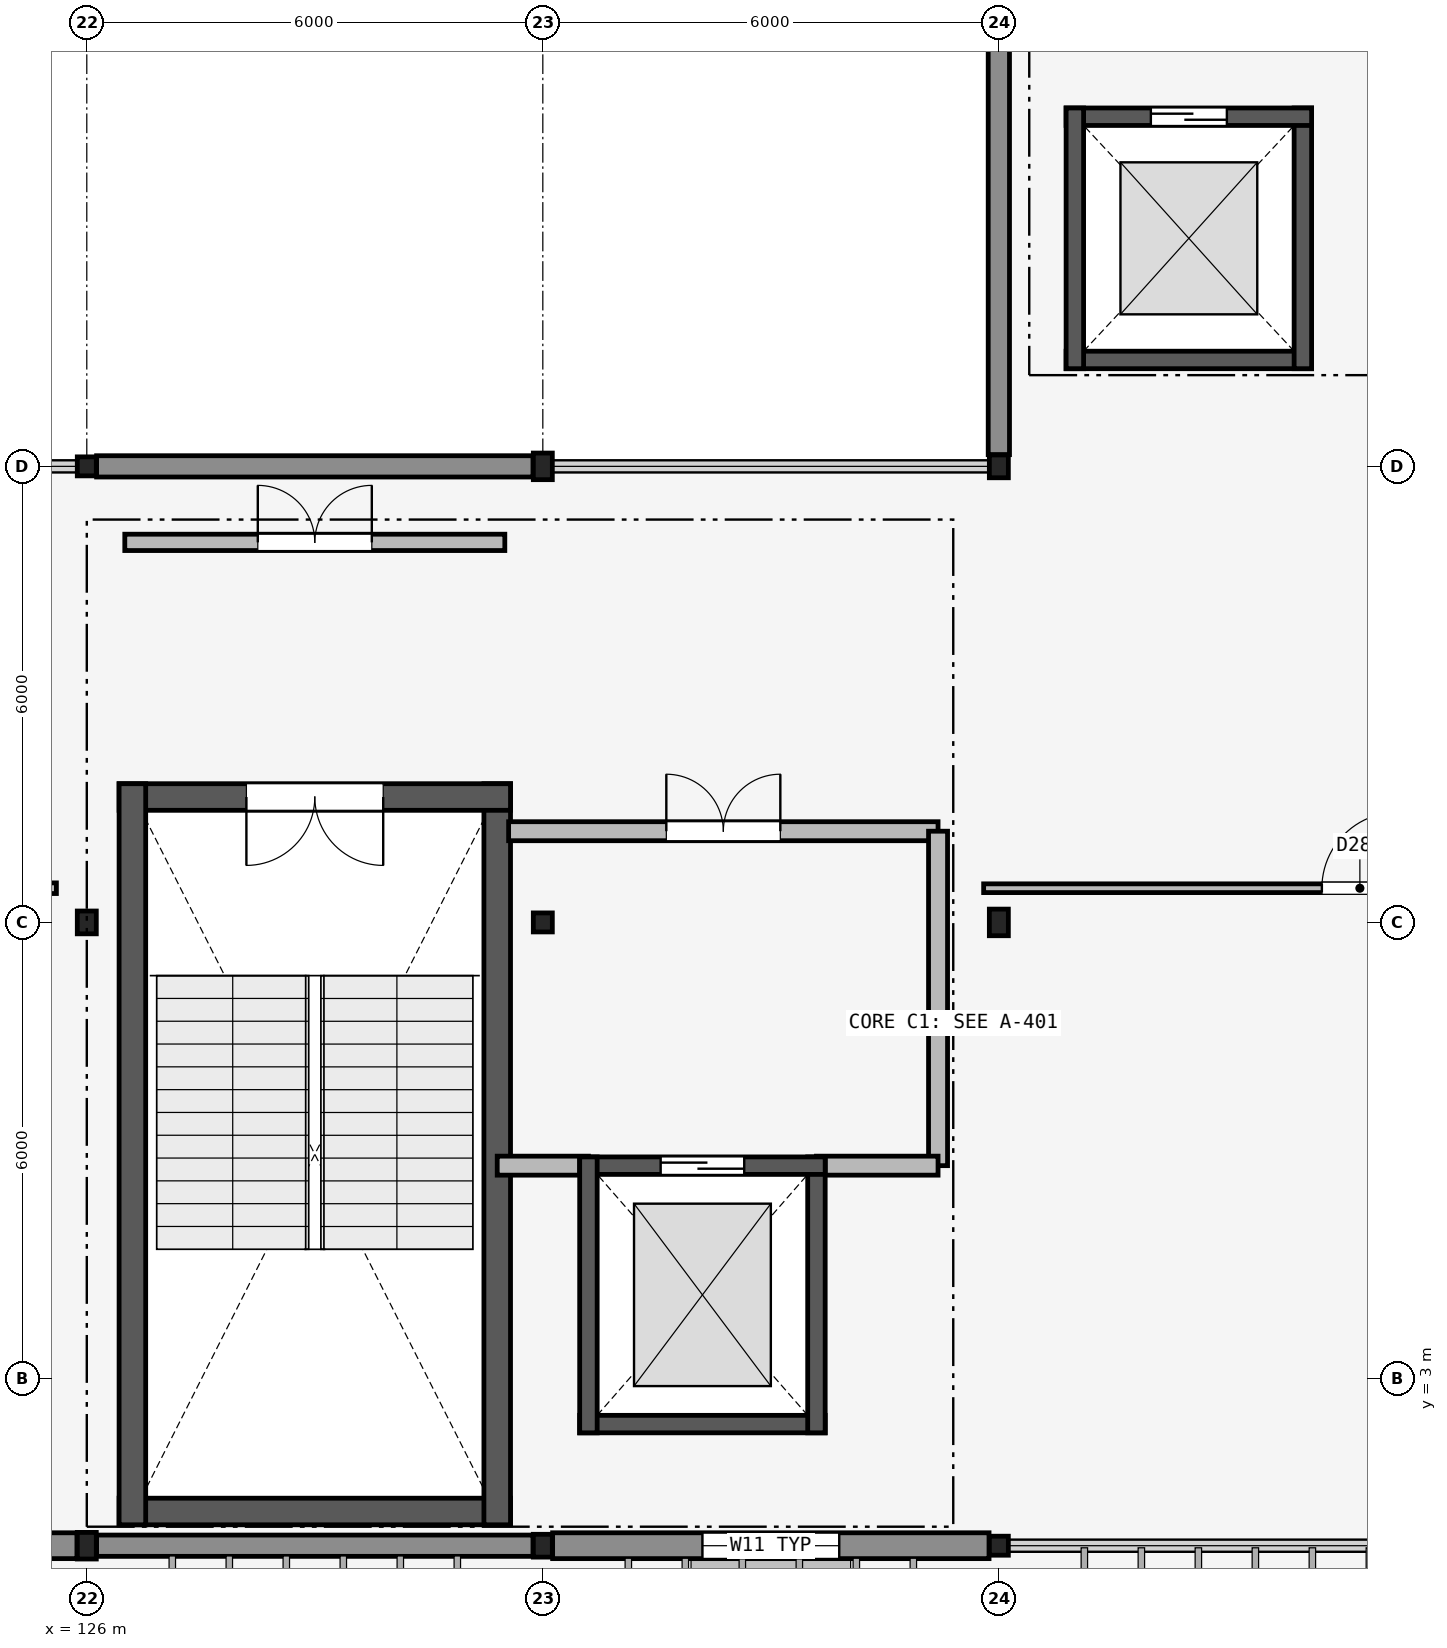
"""IFC4 building model, lengths in metres.
Left out: names, types, materials, properties, quantities, classifications, styles, units other than length and angle.
Written with IfcOpenShell. Run it as: python <this file> out.ifc"""

import sys

from ifc_helpers import new_model, si_unit, direction, frame, frame_2d, origin, origin_2d, place, context, subcontext, project, spatial, rectangle, hollow_rectangle, i_section, extrude, element, fill, save


model = new_model("IFC4")
c1 = context("Model", 3, precision=1e-05, world=origin(), true_north=direction((0.0, 1.0)))
c2 = subcontext(c1, "Body", "Model", "MODEL_VIEW")
j1 = project(units=[si_unit("LENGTHUNIT", "METRE"), si_unit("PLANEANGLEUNIT", "RADIAN")], contexts=[c1])
p1 = place(None, origin())
s1 = spatial("IfcSite", under=j1, at=p1, CompositionType="ELEMENT")
p2 = place(p1, origin())
s2 = spatial("IfcBuilding", under=s1, at=p2, CompositionType="ELEMENT")
p3 = place(p2, frame((0.0, 0.0, 22.2)))
s3 = spatial("IfcBuildingStorey", under=s2, at=p3, CompositionType="ELEMENT", Elevation=22.2)
p4 = place(p3, frame((126.0, 0.8, 0.0), z_axis=(0.0, 0.0, 1.0), x_axis=(1.0, 0.0, 0.0)))
e1 = element("IfcColumn", 1, at=p4, inside=s3, PredefinedType="COLUMN", context=c2, shape_type="SweptSolid", body=[
    extrude(i_section(OverallWidth=0.25, OverallDepth=0.35, WebThickness=0.01, FlangeThickness=0.012, FilletRadius=0.012, at=origin_2d()), origin(), (0.0, 0.0, 1.0), 3.9),
])
p5 = place(p3, frame((126.0, 9.0, 0.0), z_axis=(0.0, 0.0, 1.0), x_axis=(1.0, 0.0, 0.0)))
e2 = element("IfcColumn", 2, at=p5, inside=s3, PredefinedType="COLUMN", context=c2, shape_type="SweptSolid", body=[
    extrude(i_section(OverallWidth=0.25, OverallDepth=0.3, WebThickness=0.01, FlangeThickness=0.01, FilletRadius=0.012, at=origin_2d()), origin(), (0.0, 0.0, 1.0), 3.9),
])
p6 = place(p3, frame((126.0, 15.0, 0.0), z_axis=(0.0, 0.0, 1.0), x_axis=(1.0, 0.0, 0.0)))
e3 = element("IfcColumn", 3, at=p6, inside=s3, PredefinedType="COLUMN", context=c2, shape_type="SweptSolid", body=[
    extrude(hollow_rectangle(XDim=0.25, YDim=0.25, WallThickness=0.012, InnerFilletRadius=0.012, OuterFilletRadius=0.024, at=origin_2d()), origin(), (0.0, 0.0, 1.0), 3.9),
])
p7 = place(p3, frame((132.0, 0.8, 0.0), z_axis=(0.0, 0.0, 1.0), x_axis=(1.0, 0.0, 0.0)))
e4 = element("IfcColumn", 4, at=p7, inside=s3, PredefinedType="COLUMN", context=c2, shape_type="SweptSolid", body=[
    extrude(i_section(OverallWidth=0.25, OverallDepth=0.3, WebThickness=0.01, FlangeThickness=0.01, FilletRadius=0.012, at=origin_2d()), origin(), (0.0, 0.0, 1.0), 3.9),
])
p8 = place(p3, frame((132.0, 9.0, 0.0), z_axis=(0.0, 0.0, 1.0), x_axis=(1.0, 0.0, 0.0)))
e5 = element("IfcColumn", 5, at=p8, inside=s3, PredefinedType="COLUMN", context=c2, shape_type="SweptSolid", body=[
    extrude(hollow_rectangle(XDim=0.25, YDim=0.25, WallThickness=0.012, InnerFilletRadius=0.012, OuterFilletRadius=0.024, at=origin_2d()), origin(), (0.0, 0.0, 1.0), 3.9),
])
p9 = place(p3, frame((132.0, 15.0, 0.0), z_axis=(0.0, 0.0, 1.0), x_axis=(1.0, 0.0, 0.0)))
e6 = element("IfcColumn", 6, at=p9, inside=s3, PredefinedType="COLUMN", context=c2, shape_type="SweptSolid", body=[
    extrude(i_section(OverallWidth=0.25, OverallDepth=0.35, WebThickness=0.01, FlangeThickness=0.012, FilletRadius=0.012, at=origin_2d()), origin(), (0.0, 0.0, 1.0), 3.9),
])
p10 = place(p3, frame((138.0, 0.8, 0.0), z_axis=(0.0, 0.0, 1.0), x_axis=(1.0, 0.0, 0.0)))
e7 = element("IfcColumn", 7, at=p10, inside=s3, PredefinedType="COLUMN", context=c2, shape_type="SweptSolid", body=[
    extrude(hollow_rectangle(XDim=0.25, YDim=0.25, WallThickness=0.012, InnerFilletRadius=0.012, OuterFilletRadius=0.024, at=origin_2d()), origin(), (0.0, 0.0, 1.0), 3.9),
])
p11 = place(p3, frame((138.0, 9.0, 0.0), z_axis=(0.0, 0.0, 1.0), x_axis=(1.0, 0.0, 0.0)))
e8 = element("IfcColumn", 8, at=p11, inside=s3, PredefinedType="COLUMN", context=c2, shape_type="SweptSolid", body=[
    extrude(i_section(OverallWidth=0.25, OverallDepth=0.35, WebThickness=0.01, FlangeThickness=0.012, FilletRadius=0.012, at=origin_2d()), origin(), (0.0, 0.0, 1.0), 3.9),
])
p12 = place(p3, frame((138.0, 15.0, 0.0), z_axis=(0.0, 0.0, 1.0), x_axis=(1.0, 0.0, 0.0)))
e9 = element("IfcColumn", 9, at=p12, inside=s3, PredefinedType="COLUMN", context=c2, shape_type="SweptSolid", body=[
    extrude(i_section(OverallWidth=0.25, OverallDepth=0.3, WebThickness=0.01, FlangeThickness=0.01, FilletRadius=0.012, at=origin_2d()), origin(), (0.0, 0.0, 1.0), 3.9),
])
p13 = place(p3, frame((120.129, 0.8, 0.0), z_axis=(0.0, 0.0, 1.0), x_axis=(1.0, 0.0, 0.0)))
e10 = element("IfcWall", 10, at=p13, inside=s3, PredefinedType="SOLIDWALL", context=c2, shape_type="SweptSolid", body=[
    extrude(rectangle(XDim=5.742, YDim=0.34, at=frame_2d((2.871, 0.0))), origin(), (0.0, 0.0, 1.0), 3.23),
])
p14 = place(p13, frame((1.821, 0.0, 0.9)))
e11 = element("IfcOpeningElement", 11, at=p14, cuts=e10, PredefinedType="OPENING", context=c2, shape_type="SweptSolid", body=[
    extrude(rectangle(XDim=2.1, YDim=1.5, at=frame_2d((1.05, 0.75))), frame((0.0, 0.18, 0.0), z_axis=(0.0, -1.0, 0.0), x_axis=(1.0, 0.0, 0.0)), (0.0, 0.0, 1.0), 0.36),
])
p15 = place(p3, frame((126.129, 0.8, 0.0), z_axis=(0.0, 0.0, 1.0), x_axis=(1.0, 0.0, 0.0)))
e12 = element("IfcWall", 12, at=p15, inside=s3, PredefinedType="SOLIDWALL", context=c2, shape_type="SweptSolid", body=[
    extrude(rectangle(XDim=5.742, YDim=0.28, at=frame_2d((2.871, 0.0))), origin(), (0.0, 0.0, 1.0), 3.23),
])
p16 = place(p3, frame((132.129, 0.8, 0.0), z_axis=(0.0, 0.0, 1.0), x_axis=(1.0, 0.0, 0.0)))
e13 = element("IfcWall", 13, at=p16, inside=s3, PredefinedType="SOLIDWALL", context=c2, shape_type="SweptSolid", body=[
    extrude(rectangle(XDim=5.742, YDim=0.34, at=frame_2d((2.871, 0.0))), origin(), (0.0, 0.0, 1.0), 3.23),
])
p17 = place(p16, frame((1.971, 0.0, 0.6)))
e14 = element("IfcOpeningElement", 14, at=p17, cuts=e13, PredefinedType="OPENING", context=c2, shape_type="SweptSolid", body=[
    extrude(rectangle(XDim=1.8, YDim=2.2, at=frame_2d((0.9, 1.1))), frame((0.0, 0.18, 0.0), z_axis=(0.0, -1.0, 0.0), x_axis=(1.0, 0.0, 0.0)), (0.0, 0.0, 1.0), 0.36),
])
p18 = place(p3, frame((126.129, 15.0, 0.0), z_axis=(0.0, 0.0, 1.0), x_axis=(1.0, 0.0, 0.0)))
e15 = element("IfcWall", 15, at=p18, inside=s3, PredefinedType="SOLIDWALL", context=c2, shape_type="SweptSolid", body=[
    extrude(rectangle(XDim=5.742, YDim=0.28, at=frame_2d((2.871, 0.0))), origin(), (0.0, 0.0, 1.0), 3.08),
])
p19 = place(p3, frame((138.0, 15.154, 0.0), z_axis=(0.0, 0.0, 1.0), x_axis=(0.0, 1.0, 0.0)))
e16 = element("IfcWall", 16, at=p19, inside=s3, PredefinedType="SOLIDWALL", context=c2, shape_type="SweptSolid", body=[
    extrude(rectangle(XDim=5.717, YDim=0.28, at=frame_2d((2.858, 0.0))), origin(), (0.0, 0.0, 1.0), 3.23),
])
p20 = place(p3, frame((126.425, 1.25, 0.0), z_axis=(0.0, 0.0, 1.0), x_axis=(1.0, 0.0, 0.0)))
e17 = element("IfcWall", 17, at=p20, inside=s3, PredefinedType="SHEAR", context=c2, shape_type="SweptSolid", body=[
    extrude(rectangle(XDim=5.15, YDim=0.35, at=frame_2d((2.575, 0.0))), origin(), (0.0, 0.0, 1.0), 3.76),
])
p21 = place(p3, frame((131.4, 1.075, 0.0), z_axis=(0.0, 0.0, 1.0), x_axis=(0.0, 1.0, 0.0)))
e18 = element("IfcWall", 18, at=p21, inside=s3, PredefinedType="SHEAR", context=c2, shape_type="SweptSolid", body=[
    extrude(rectangle(XDim=9.75, YDim=0.35, at=frame_2d((4.875, 0.0))), origin(), (0.0, 0.0, 1.0), 3.76),
])
p22 = place(p3, frame((131.575, 10.65, 0.0), z_axis=(0.0, 0.0, 1.0), x_axis=(-1.0, 0.0, 0.0)))
e19 = element("IfcWall", 19, at=p22, inside=s3, PredefinedType="SHEAR", context=c2, shape_type="SweptSolid", body=[
    extrude(rectangle(XDim=5.15, YDim=0.35, at=frame_2d((2.575, 0.0))), origin(), (0.0, 0.0, 1.0), 3.76),
])
p23 = place(p22, frame((1.675, 0.0, 0.0)))
e20 = element("IfcOpeningElement", 20, at=p23, cuts=e19, PredefinedType="OPENING", context=c2, shape_type="SweptSolid", body=[
    extrude(rectangle(XDim=1.8, YDim=2.2, at=frame_2d((0.9, 1.1))), frame((0.0, 0.185, 0.0), z_axis=(0.0, -1.0, 0.0), x_axis=(1.0, 0.0, 0.0)), (0.0, 0.0, 1.0), 0.37),
])
p24 = place(p3, frame((126.6, 10.825, 0.0), z_axis=(0.0, 0.0, 1.0), x_axis=(0.0, -1.0, 0.0)))
e21 = element("IfcWall", 21, at=p24, inside=s3, PredefinedType="SHEAR", context=c2, shape_type="SweptSolid", body=[
    extrude(rectangle(XDim=9.75, YDim=0.35, at=frame_2d((4.875, 0.0))), origin(), (0.0, 0.0, 1.0), 3.76),
])
p25 = place(p3, frame((126.5, 14.0, 0.0), z_axis=(0.0, 0.0, 1.0), x_axis=(1.0, 0.0, 0.0)))
e22 = element("IfcWall", 22, at=p25, inside=s3, PredefinedType="PARTITIONING", context=c2, shape_type="SweptSolid", body=[
    extrude(rectangle(XDim=5.0, YDim=0.215, at=frame_2d((2.5, 0.0))), origin(), (0.0, 0.0, 1.0), 3.68),
])
p26 = place(p25, frame((1.75, 0.0, 0.0)))
e23 = element("IfcOpeningElement", 23, at=p26, cuts=e22, PredefinedType="OPENING", context=c2, shape_type="SweptSolid", body=[
    extrude(rectangle(XDim=1.5, YDim=2.15, at=frame_2d((0.75, 1.075))), frame((0.0, 0.117, 0.0), z_axis=(0.0, -1.0, 0.0), x_axis=(1.0, 0.0, 0.0)), (0.0, 0.0, 1.0), 0.235),
])
p27 = place(p3, frame((131.55, 10.2, 0.0), z_axis=(0.0, 0.0, 1.0), x_axis=(1.0, 0.0, 0.0)))
e24 = element("IfcWall", 24, at=p27, inside=s3, PredefinedType="PARTITIONING", context=c2, shape_type="SweptSolid", body=[
    extrude(rectangle(XDim=5.65, YDim=0.25, at=frame_2d((2.825, 0.0))), origin(), (0.0, 0.0, 1.0), 3.28),
])
p28 = place(p27, frame((2.075, 0.0, 0.0)))
e25 = element("IfcOpeningElement", 25, at=p28, cuts=e24, PredefinedType="OPENING", context=c2, shape_type="SweptSolid", body=[
    extrude(rectangle(XDim=1.5, YDim=2.15, at=frame_2d((0.75, 1.075))), frame((0.0, 0.135, 0.0), z_axis=(0.0, -1.0, 0.0), x_axis=(1.0, 0.0, 0.0)), (0.0, 0.0, 1.0), 0.27),
])
p29 = place(p3, frame((137.2, 5.8, 0.0), z_axis=(0.0, 0.0, 1.0), x_axis=(0.0, 1.0, 0.0)))
e26 = element("IfcWall", 26, at=p29, inside=s3, PredefinedType="PARTITIONING", context=c2, shape_type="SweptSolid", body=[
    extrude(rectangle(XDim=4.4, YDim=0.25, at=frame_2d((2.2, 0.0))), origin(), (0.0, 0.0, 1.0), 3.23),
])
p30 = place(p3, frame((135.6, 5.8, 0.0), z_axis=(0.0, 0.0, 1.0), x_axis=(1.0, 0.0, 0.0)))
e27 = element("IfcWall", 27, at=p30, inside=s3, PredefinedType="PARTITIONING", context=c2, shape_type="SweptSolid", body=[
    extrude(rectangle(XDim=1.6, YDim=0.25, at=frame_2d((0.8, 0.0))), origin(), (0.0, 0.0, 1.0), 3.68),
])
p31 = place(p3, frame((131.4, 5.8, 0.0), z_axis=(0.0, 0.0, 1.0), x_axis=(1.0, 0.0, 0.0)))
e28 = element("IfcWall", 28, at=p31, inside=s3, PredefinedType="PARTITIONING", context=c2, shape_type="SweptSolid", body=[
    extrude(rectangle(XDim=1.2, YDim=0.25, at=frame_2d((0.6, 0.0))), origin(), (0.0, 0.0, 1.0), 3.23),
])
p32 = place(p3, frame((132.485, 2.4, 0.0), z_axis=(0.0, 0.0, 1.0), x_axis=(1.0, 0.0, 0.0)))
e29 = element("IfcWall", 29, at=p32, inside=s3, PredefinedType="SHEAR", context=c2, shape_type="SweptSolid", body=[
    extrude(rectangle(XDim=3.23, YDim=0.23, at=frame_2d((1.615, 0.0))), origin(), (0.0, 0.0, 1.0), 3.9),
])
p33 = place(p3, frame((135.6, 2.285, 0.0), z_axis=(0.0, 0.0, 1.0), x_axis=(0.0, 1.0, 0.0)))
e30 = element("IfcWall", 30, at=p33, inside=s3, PredefinedType="SHEAR", context=c2, shape_type="SweptSolid", body=[
    extrude(rectangle(XDim=3.63, YDim=0.23, at=frame_2d((1.815, 0.0))), origin(), (0.0, 0.0, 1.0), 3.9),
])
p34 = place(p3, frame((135.715, 5.8, 0.0), z_axis=(0.0, 0.0, 1.0), x_axis=(-1.0, 0.0, 0.0)))
e31 = element("IfcWall", 31, at=p34, inside=s3, PredefinedType="SHEAR", context=c2, shape_type="SweptSolid", body=[
    extrude(rectangle(XDim=3.23, YDim=0.23, at=frame_2d((1.615, 0.0))), origin(), (0.0, 0.0, 1.0), 3.9),
])
p35 = place(p34, frame((1.065, 0.0, 0.0)))
e32 = element("IfcOpeningElement", 32, at=p35, cuts=e31, PredefinedType="OPENING", context=c2, shape_type="SweptSolid", body=[
    extrude(rectangle(XDim=1.1, YDim=2.2, at=frame_2d((0.55, 1.1))), frame((0.0, 0.125, 0.0), z_axis=(0.0, -1.0, 0.0), x_axis=(1.0, 0.0, 0.0)), (0.0, 0.0, 1.0), 0.25),
])
p36 = place(p3, frame((132.6, 5.915, 0.0), z_axis=(0.0, 0.0, 1.0), x_axis=(0.0, -1.0, 0.0)))
e33 = element("IfcWall", 33, at=p36, inside=s3, PredefinedType="SHEAR", context=c2, shape_type="SweptSolid", body=[
    extrude(rectangle(XDim=3.63, YDim=0.23, at=frame_2d((1.815, 0.0))), origin(), (0.0, 0.0, 1.0), 3.9),
])
p37 = place(p3, frame((138.885, 16.4, 0.0), z_axis=(0.0, 0.0, 1.0), x_axis=(1.0, 0.0, 0.0)))
e34 = element("IfcWall", 34, at=p37, inside=s3, PredefinedType="SHEAR", context=c2, shape_type="SweptSolid", body=[
    extrude(rectangle(XDim=3.23, YDim=0.23, at=frame_2d((1.615, 0.0))), origin(), (0.0, 0.0, 1.0), 3.9),
])
p38 = place(p3, frame((142.0, 16.285, 0.0), z_axis=(0.0, 0.0, 1.0), x_axis=(0.0, 1.0, 0.0)))
e35 = element("IfcWall", 35, at=p38, inside=s3, PredefinedType="SHEAR", context=c2, shape_type="SweptSolid", body=[
    extrude(rectangle(XDim=3.43, YDim=0.23, at=frame_2d((1.715, 0.0))), origin(), (0.0, 0.0, 1.0), 3.9),
])
p39 = place(p3, frame((142.115, 19.6, 0.0), z_axis=(0.0, 0.0, 1.0), x_axis=(-1.0, 0.0, 0.0)))
e36 = element("IfcWall", 36, at=p39, inside=s3, PredefinedType="SHEAR", context=c2, shape_type="SweptSolid", body=[
    extrude(rectangle(XDim=3.23, YDim=0.23, at=frame_2d((1.615, 0.0))), origin(), (0.0, 0.0, 1.0), 3.9),
])
p40 = place(p39, frame((1.115, 0.0, 0.0)))
e37 = element("IfcOpeningElement", 37, at=p40, cuts=e36, PredefinedType="OPENING", context=c2, shape_type="SweptSolid", body=[
    extrude(rectangle(XDim=1.0, YDim=2.15, at=frame_2d((0.5, 1.075))), frame((0.0, 0.125, 0.0), z_axis=(0.0, -1.0, 0.0), x_axis=(1.0, 0.0, 0.0)), (0.0, 0.0, 1.0), 0.25),
])
p41 = place(p3, frame((139.0, 19.715, 0.0), z_axis=(0.0, 0.0, 1.0), x_axis=(0.0, -1.0, 0.0)))
e38 = element("IfcWall", 38, at=p41, inside=s3, PredefinedType="SHEAR", context=c2, shape_type="SweptSolid", body=[
    extrude(rectangle(XDim=3.43, YDim=0.23, at=frame_2d((1.715, 0.0))), origin(), (0.0, 0.0, 1.0), 3.9),
])
p42 = place(p3, frame((108.5, 9.45, 0.0), z_axis=(0.0, 0.0, 1.0), x_axis=(1.0, 0.0, 0.0)))
e39 = element("IfcWall", 39, at=p42, inside=s3, PredefinedType="PARTITIONING", context=c2, shape_type="SweptSolid", body=[
    extrude(rectangle(XDim=17.1, YDim=0.14, at=frame_2d((8.55, 0.0))), origin(), (0.0, 0.0, 1.0), 3.28),
])
p43 = place(p42, frame((8.025, 0.0, 0.0)))
e40 = element("IfcOpeningElement", 40, at=p43, cuts=e39, PredefinedType="OPENING", context=c2, shape_type="SweptSolid", body=[
    extrude(rectangle(XDim=1.05, YDim=2.2, at=frame_2d((0.525, 1.1))), frame((0.0, 0.08, 0.0), z_axis=(0.0, -1.0, 0.0), x_axis=(1.0, 0.0, 0.0)), (0.0, 0.0, 1.0), 0.16),
])
p44 = place(p3, frame((137.8, 9.45, 0.0), z_axis=(0.0, 0.0, 1.0), x_axis=(1.0, 0.0, 0.0)))
e41 = element("IfcWall", 41, at=p44, inside=s3, PredefinedType="PARTITIONING", context=c2, shape_type="SweptSolid", body=[
    extrude(rectangle(XDim=10.8, YDim=0.115, at=frame_2d((5.4, 0.0))), origin(), (0.0, 0.0, 1.0), 3.28),
])
p45 = place(p44, frame((4.45, 0.0, 0.0)))
e42 = element("IfcOpeningElement", 42, at=p45, cuts=e41, PredefinedType="OPENING", context=c2, shape_type="SweptSolid", body=[
    extrude(rectangle(XDim=1.0, YDim=2.15, at=frame_2d((0.5, 1.075))), frame((0.0, 0.067, 0.0), z_axis=(0.0, -1.0, 0.0), x_axis=(1.0, 0.0, 0.0)), (0.0, 0.0, 1.0), 0.135),
])
p46 = place(p17, origin())
e43 = element("IfcWindow", 43, at=p46, inside=s3, PartitioningType="SINGLE_PANEL", PredefinedType="WINDOW", context=c2, shape_type="SweptSolid", body=[
    extrude(rectangle(XDim=1.8, YDim=2.2, at=frame_2d((0.9, 1.1))), frame((0.0, 0.03, 0.0), z_axis=(0.0, -1.0, 0.0), x_axis=(1.0, 0.0, 0.0)), (0.0, 0.0, 1.0), 0.06),
])
fill(e14, e43)
p47 = place(p23, origin())
e44 = element("IfcDoor", 44, at=p47, inside=s3, OperationType="DOUBLE_DOOR_SINGLE_SWING", PredefinedType="DOOR", context=c2, shape_type="SweptSolid", body=[
    extrude(rectangle(XDim=1.8, YDim=2.2, at=frame_2d((0.9, 1.1))), frame((0.0, 0.025, 0.0), z_axis=(0.0, -1.0, 0.0), x_axis=(1.0, 0.0, 0.0)), (0.0, 0.0, 1.0), 0.05),
])
fill(e20, e44)
p48 = place(p26, origin())
e45 = element("IfcDoor", 45, at=p48, inside=s3, OperationType="DOUBLE_DOOR_SINGLE_SWING", PredefinedType="DOOR", context=c2, shape_type="SweptSolid", body=[
    extrude(rectangle(XDim=1.5, YDim=2.15, at=frame_2d((0.75, 1.075))), frame((0.0, 0.025, 0.0), z_axis=(0.0, -1.0, 0.0), x_axis=(1.0, 0.0, 0.0)), (0.0, 0.0, 1.0), 0.05),
])
fill(e23, e45)
p49 = place(p28, origin())
e46 = element("IfcDoor", 46, at=p49, inside=s3, OperationType="DOUBLE_DOOR_SINGLE_SWING", PredefinedType="DOOR", context=c2, shape_type="SweptSolid", body=[
    extrude(rectangle(XDim=1.5, YDim=2.15, at=frame_2d((0.75, 1.075))), frame((0.0, 0.025, 0.0), z_axis=(0.0, -1.0, 0.0), x_axis=(1.0, 0.0, 0.0)), (0.0, 0.0, 1.0), 0.05),
])
fill(e25, e46)
p50 = place(p35, origin())
e47 = element("IfcDoor", 47, at=p50, inside=s3, OperationType="SLIDING_TO_LEFT", PredefinedType="DOOR", context=c2, shape_type="SweptSolid", body=[
    extrude(rectangle(XDim=1.1, YDim=2.2, at=frame_2d((0.55, 1.1))), frame((0.0, 0.025, 0.0), z_axis=(0.0, -1.0, 0.0), x_axis=(1.0, 0.0, 0.0)), (0.0, 0.0, 1.0), 0.05),
])
fill(e32, e47)
p51 = place(p40, origin())
e48 = element("IfcDoor", 48, at=p51, inside=s3, OperationType="SLIDING_TO_LEFT", PredefinedType="DOOR", context=c2, shape_type="SweptSolid", body=[
    extrude(rectangle(XDim=1.0, YDim=2.15, at=frame_2d((0.5, 1.075))), frame((0.0, 0.025, 0.0), z_axis=(0.0, -1.0, 0.0), x_axis=(1.0, 0.0, 0.0)), (0.0, 0.0, 1.0), 0.05),
])
fill(e37, e48)
p52 = place(p45, origin())
e49 = element("IfcDoor", 49, at=p52, inside=s3, OperationType="SINGLE_SWING_RIGHT", PredefinedType="DOOR", context=c2, shape_type="SweptSolid", body=[
    extrude(rectangle(XDim=1.0, YDim=2.15, at=frame_2d((0.5, 1.075))), frame((0.0, 0.025, 0.0), z_axis=(0.0, -1.0, 0.0), x_axis=(1.0, 0.0, 0.0)), (0.0, 0.0, 1.0), 0.05),
])
fill(e42, e49)
save(model, sys.argv[1])
